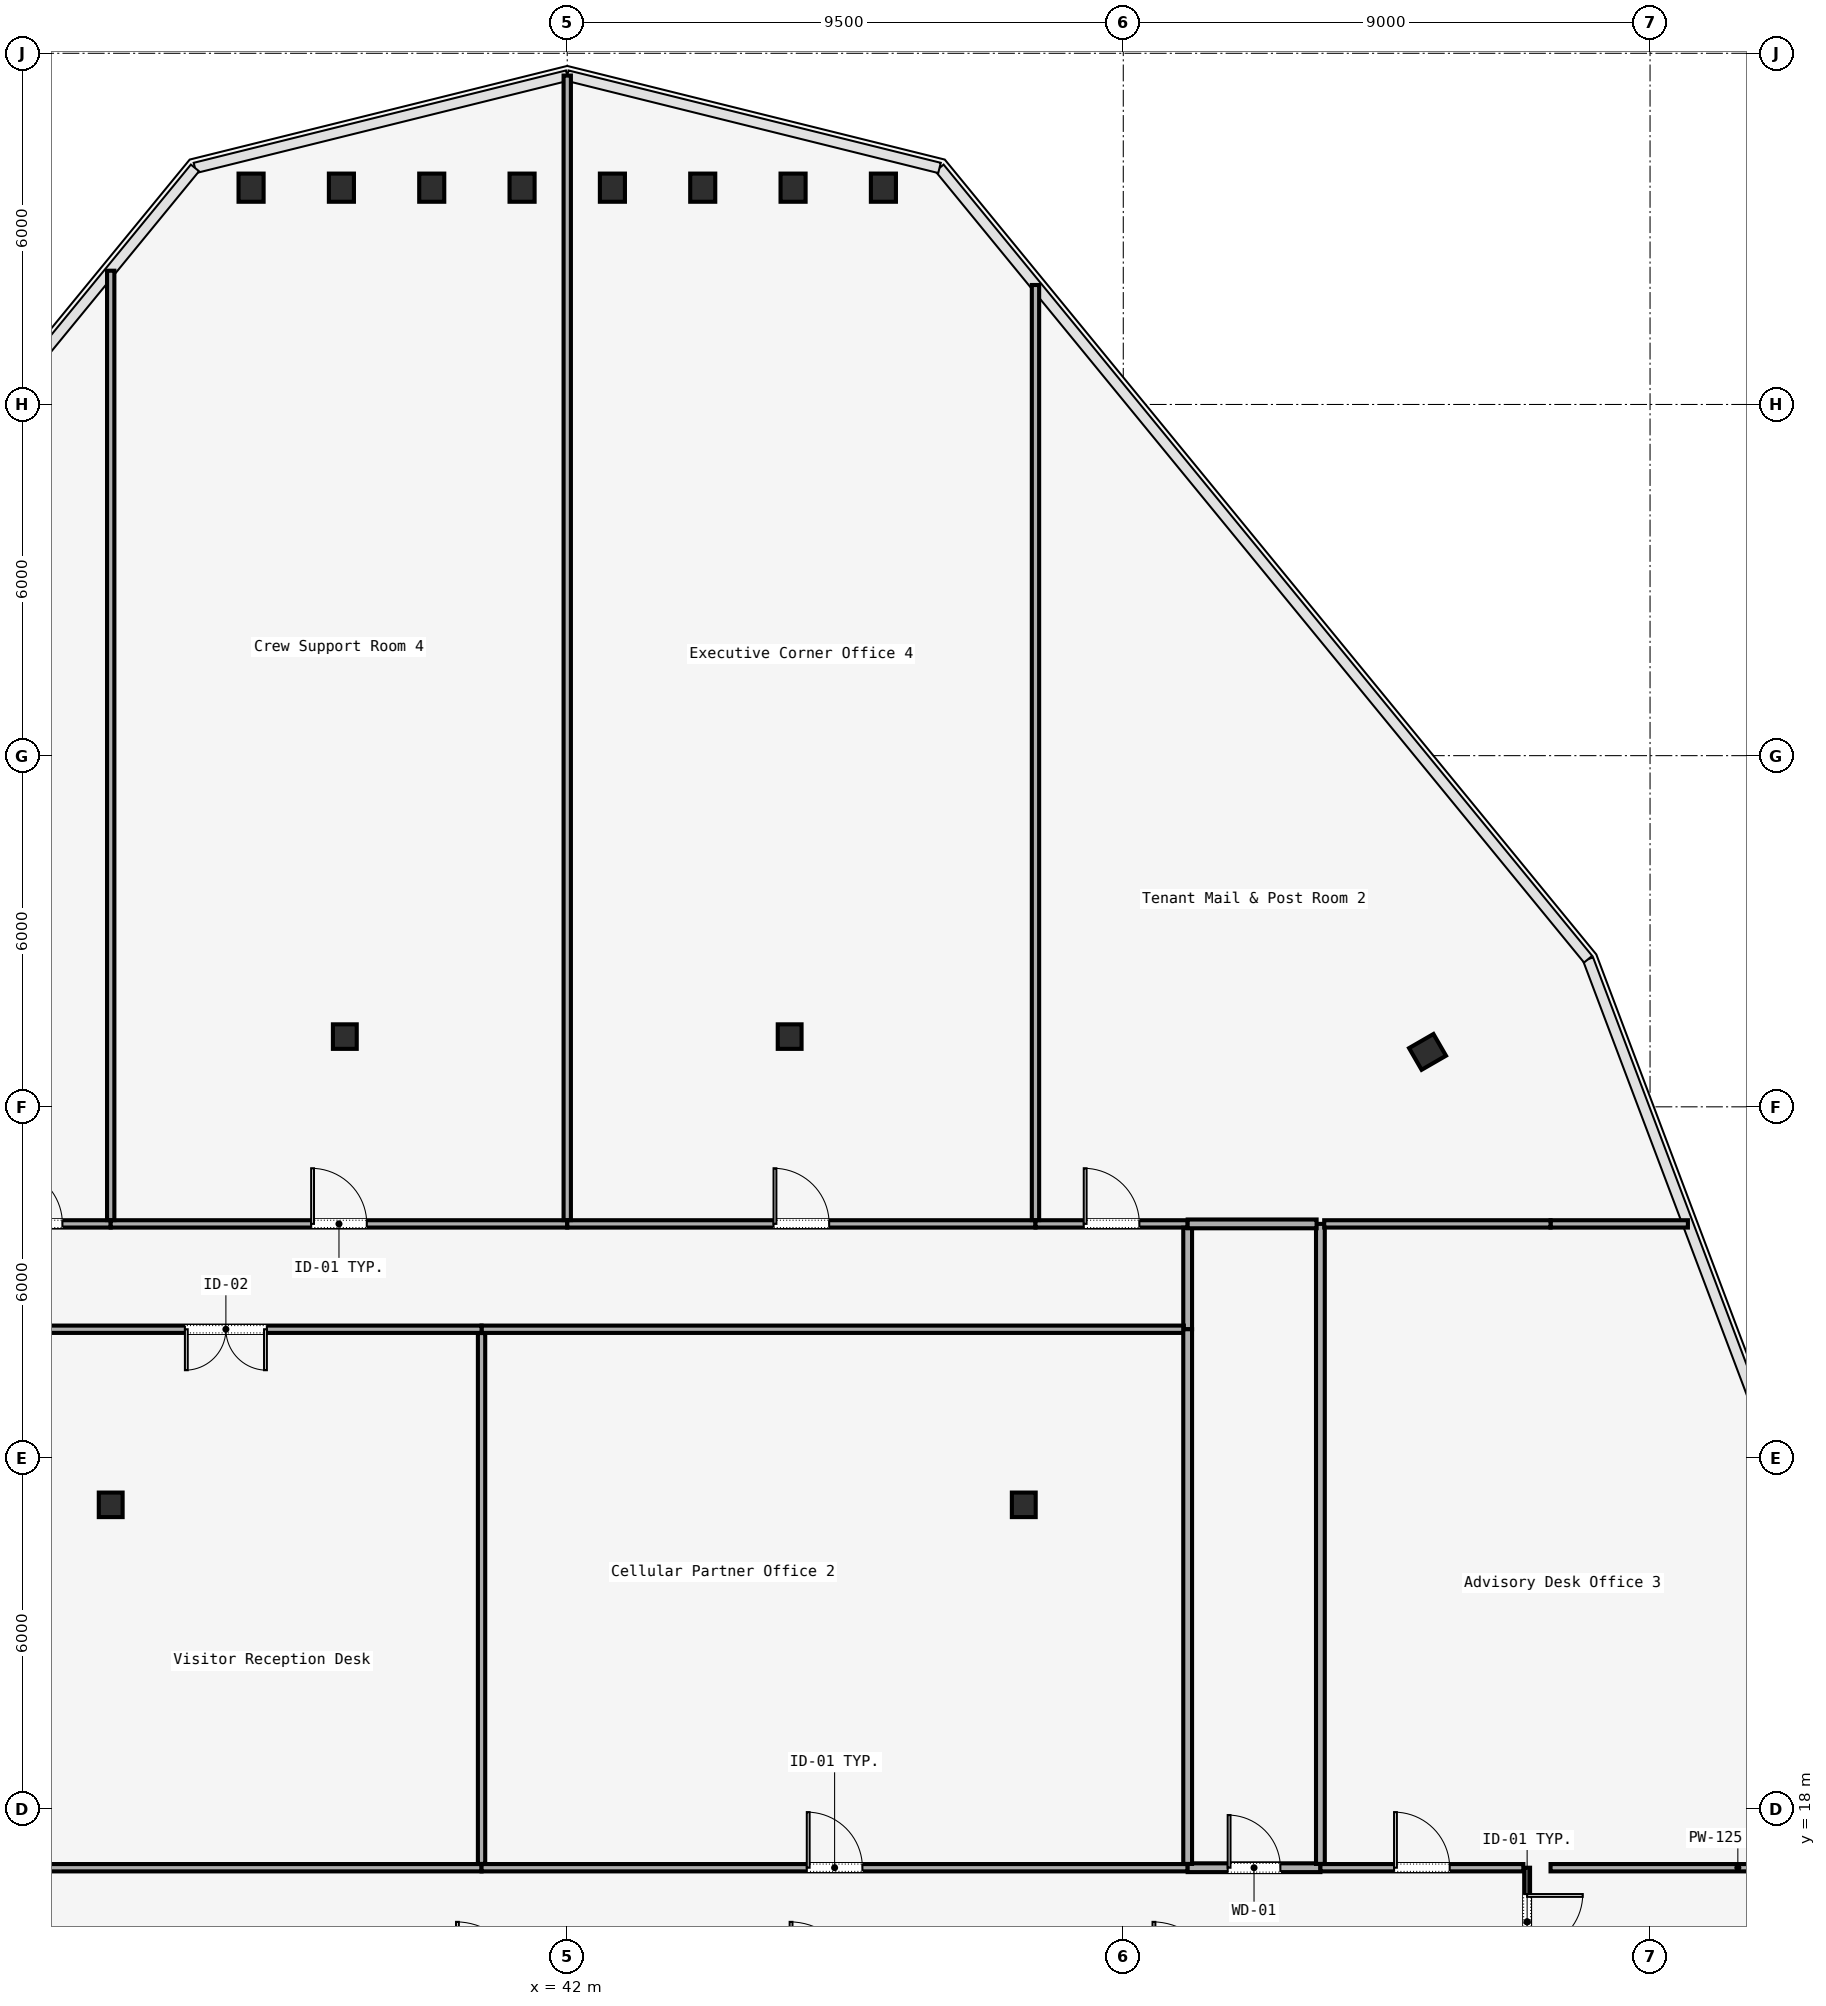
"""IFC4 building model, lengths in metres.
Left out: names, types, materials, properties, quantities, classifications, styles, units other than length and angle.
Written with IfcOpenShell. Run it as: python <this file> out.ifc"""

import sys

from ifc_helpers import new_model, si_unit, direction, frame, frame_2d, origin, origin_2d, place, context, subcontext, project, spatial, rectangle, i_section, extrude, element, fill, save


model = new_model("IFC4")
c1 = context("Model", 3, precision=1e-05, world=origin(), true_north=direction((0.0, 1.0)))
c2 = subcontext(c1, "Body", "Model", "MODEL_VIEW")
j1 = project(units=[si_unit("LENGTHUNIT", "METRE"), si_unit("PLANEANGLEUNIT", "RADIAN")], contexts=[c1])
p1 = place(None, origin())
s1 = spatial("IfcSite", under=j1, at=p1, CompositionType="ELEMENT")
p2 = place(p1, origin())
s2 = spatial("IfcBuilding", under=s1, at=p2, CompositionType="ELEMENT")
p3 = place(p2, frame((0.0, 0.0, 117.4)))
s3 = spatial("IfcBuildingStorey", under=s2, at=p3, CompositionType="ELEMENT", Elevation=117.4)
for number, where, z_axis, x_axis in (
    (1, (34.2, 23.2, 0.0), (0.0, 0.0, 1.0), (1.0, 0.0, 0.0)),
    (2, (49.8, 23.2, 0.0), (0.0, 0.0, 1.0), (1.0, 0.0, 0.0)),
    (3, (38.2, 31.2, 0.0), (0.0, 0.0, 1.0), (1.0, 0.0, 0.0)),
    (4, (45.8, 31.2, 0.0), (0.0, 0.0, 1.0), (1.0, 0.0, 0.0)),
):
    element("IfcColumn", number, at=place(p3, frame(where, z_axis=z_axis, x_axis=x_axis)), inside=s3, PredefinedType="COLUMN", context=c2, shape_type="SweptSolid", body=[
        extrude(i_section(OverallWidth=0.407, OverallDepth=0.419, WebThickness=0.031, FlangeThickness=0.049, FilletRadius=0.015, at=origin_2d()), origin(), (0.0, 0.0, 1.0), 4.52),
    ])
for number, where, z_axis, x_axis in (
    (5, (56.698, 30.938, 0.0), (0.0, 0.0, 1.0), (-0.5, 0.866, 0.0)),
    (6, (47.402, 45.704, 0.0), (0.0, 0.0, 1.0), (1.0, 0.0, 0.0)),
    (7, (45.858, 45.704, 0.0), (0.0, 0.0, 1.0), (1.0, 0.0, 0.0)),
    (8, (44.315, 45.704, 0.0), (0.0, 0.0, 1.0), (1.0, 0.0, 0.0)),
    (9, (42.772, 45.704, 0.0), (0.0, 0.0, 1.0), (1.0, 0.0, 0.0)),
    (10, (41.228, 45.704, 0.0), (0.0, 0.0, 1.0), (1.0, 0.0, 0.0)),
    (11, (39.685, 45.704, 0.0), (0.0, 0.0, 1.0), (1.0, 0.0, 0.0)),
    (12, (38.142, 45.704, 0.0), (0.0, 0.0, 1.0), (1.0, 0.0, 0.0)),
    (13, (36.598, 45.704, 0.0), (0.0, 0.0, 1.0), (1.0, 0.0, 0.0)),
):
    element("IfcColumn", number, at=place(p3, frame(where, z_axis=z_axis, x_axis=x_axis)), inside=s3, PredefinedType="COLUMN", context=c2, shape_type="SweptSolid", body=[
        extrude(i_section(OverallWidth=0.428, OverallDepth=0.481, WebThickness=0.051, FlangeThickness=0.065, FilletRadius=0.015, at=origin_2d()), origin(), (0.0, 0.0, 1.0), 4.52),
    ])
p4 = place(p3, frame((58.4, 17.0, 0.0), z_axis=(0.0, 0.0, 1.0), x_axis=(0.0, -1.0, 0.0)))
e14 = element("IfcWall", 14, at=p4, inside=s3, PredefinedType="MOVABLE", context=c2, shape_type="SweptSolid", body=[
    extrude(rectangle(XDim=1.85, YDim=0.1, at=frame_2d((0.925, 0.0))), origin(), (0.0, 0.0, 1.0), 3.39),
])
p5 = place(p4, frame((0.45, 0.0, 0.0)))
e15 = element("IfcOpeningElement", 15, at=p5, cuts=e14, PredefinedType="OPENING", context=c2, shape_type="SweptSolid", body=[
    extrude(rectangle(XDim=0.95, YDim=2.2, at=frame_2d((0.475, 1.1))), frame((0.0, 0.05, 0.0), z_axis=(0.0, -1.0, 0.0), x_axis=(1.0, 0.0, 0.0)), (0.0, 0.0, 1.0), 0.1),
])
p6 = place(p3, frame((31.6, 28.0, 0.0), z_axis=(0.0, 0.0, 1.0), x_axis=(1.0, 0.0, 0.0)))
e16 = element("IfcWall", 16, at=p6, inside=s3, PredefinedType="PARTITIONING", context=c2, shape_type="SweptSolid", body=[
    extrude(rectangle(XDim=2.6, YDim=0.125, at=frame_2d((1.3, 0.0))), origin(), (0.0, 0.0, 1.0), 3.39),
])
p7 = place(p6, frame((0.825, 0.0, 0.0)))
e17 = element("IfcOpeningElement", 17, at=p7, cuts=e16, PredefinedType="OPENING", context=c2, shape_type="SweptSolid", body=[
    extrude(rectangle(XDim=0.95, YDim=2.2, at=frame_2d((0.475, 1.1))), frame((0.0, 0.062, 0.0), z_axis=(0.0, -1.0, 0.0), x_axis=(1.0, 0.0, 0.0)), (0.0, 0.0, 1.0), 0.125),
])
p8 = place(p3, frame((34.2, 28.0, 0.0), z_axis=(0.0, 0.0, 1.0), x_axis=(1.0, 0.0, 0.0)))
e18 = element("IfcWall", 18, at=p8, inside=s3, PredefinedType="PARTITIONING", context=c2, shape_type="SweptSolid", body=[
    extrude(rectangle(XDim=7.8, YDim=0.125, at=frame_2d((3.9, 0.0))), origin(), (0.0, 0.0, 1.0), 3.39),
])
p9 = place(p8, frame((3.425, 0.0, 0.0)))
e19 = element("IfcOpeningElement", 19, at=p9, cuts=e18, PredefinedType="OPENING", context=c2, shape_type="SweptSolid", body=[
    extrude(rectangle(XDim=0.95, YDim=2.2, at=frame_2d((0.475, 1.1))), frame((0.0, 0.062, 0.0), z_axis=(0.0, -1.0, 0.0), x_axis=(1.0, 0.0, 0.0)), (0.0, 0.0, 1.0), 0.125),
])
p10 = place(p3, frame((42.0, 28.0, 0.0), z_axis=(0.0, 0.0, 1.0), x_axis=(1.0, 0.0, 0.0)))
e20 = element("IfcWall", 20, at=p10, inside=s3, PredefinedType="PARTITIONING", context=c2, shape_type="SweptSolid", body=[
    extrude(rectangle(XDim=8.0, YDim=0.125, at=frame_2d((4.0, 0.0))), origin(), (0.0, 0.0, 1.0), 3.39),
])
p11 = place(p10, frame((3.525, 0.0, 0.0)))
e21 = element("IfcOpeningElement", 21, at=p11, cuts=e20, PredefinedType="OPENING", context=c2, shape_type="SweptSolid", body=[
    extrude(rectangle(XDim=0.95, YDim=2.2, at=frame_2d((0.475, 1.1))), frame((0.0, 0.062, 0.0), z_axis=(0.0, -1.0, 0.0), x_axis=(1.0, 0.0, 0.0)), (0.0, 0.0, 1.0), 0.125),
])
p12 = place(p3, frame((50.0, 28.0, 0.0), z_axis=(0.0, 0.0, 1.0), x_axis=(1.0, 0.0, 0.0)))
e22 = element("IfcWall", 22, at=p12, inside=s3, PredefinedType="PARTITIONING", context=c2, shape_type="SweptSolid", body=[
    extrude(rectangle(XDim=2.6, YDim=0.125, at=frame_2d((1.3, 0.0))), origin(), (0.0, 0.0, 1.0), 3.39),
])
p13 = place(p12, frame((0.825, 0.0, 0.0)))
e23 = element("IfcOpeningElement", 23, at=p13, cuts=e22, PredefinedType="OPENING", context=c2, shape_type="SweptSolid", body=[
    extrude(rectangle(XDim=0.95, YDim=2.2, at=frame_2d((0.475, 1.1))), frame((0.0, 0.062, 0.0), z_axis=(0.0, -1.0, 0.0), x_axis=(1.0, 0.0, 0.0)), (0.0, 0.0, 1.0), 0.125),
])
p14 = place(p3, frame((52.6, 27.935, 0.0), z_axis=(0.0, 0.0, 1.0), x_axis=(0.0, -1.0, 0.0)))
e24 = element("IfcWall", 24, at=p14, inside=s3, PredefinedType="PARTITIONING", context=c2, shape_type="SweptSolid", body=[
    extrude(rectangle(XDim=1.735, YDim=0.15, at=frame_2d((0.868, 0.0))), origin(), (0.0, 0.0, 1.0), 3.39),
])
p15 = place(p3, frame((52.535, 26.2, 0.0), z_axis=(0.0, 0.0, 1.0), x_axis=(-1.0, 0.0, 0.0)))
e25 = element("IfcWall", 25, at=p15, inside=s3, PredefinedType="PARTITIONING", context=c2, shape_type="SweptSolid", body=[
    extrude(rectangle(XDim=11.999, YDim=0.125, at=frame_2d((6.0, 0.0))), origin(), (0.0, 0.0, 1.0), 3.39),
])
p16 = place(p3, frame((40.536, 26.2, 0.0), z_axis=(0.0, 0.0, 1.0), x_axis=(-1.0, 0.0, 0.0)))
e26 = element("IfcWall", 26, at=p16, inside=s3, PredefinedType="PARTITIONING", context=c2, shape_type="SweptSolid", body=[
    extrude(rectangle(XDim=8.736, YDim=0.125, at=frame_2d((4.368, 0.0))), origin(), (0.0, 0.0, 1.0), 3.39),
])
p17 = place(p16, frame((3.668, 0.0, 0.0)))
e27 = element("IfcOpeningElement", 27, at=p17, cuts=e26, PredefinedType="OPENING", context=c2, shape_type="SweptSolid", body=[
    extrude(rectangle(XDim=1.4, YDim=2.2, at=frame_2d((0.7, 1.1))), frame((0.0, 0.062, 0.0), z_axis=(0.0, -1.0, 0.0), x_axis=(1.0, 0.0, 0.0)), (0.0, 0.0, 1.0), 0.125),
])
p18 = place(p3, frame((31.8, 17.0, 0.0), z_axis=(0.0, 0.0, 1.0), x_axis=(1.0, 0.0, 0.0)))
e28 = element("IfcWall", 28, at=p18, inside=s3, PredefinedType="PARTITIONING", context=c2, shape_type="SweptSolid", body=[
    extrude(rectangle(XDim=8.736, YDim=0.125, at=frame_2d((4.368, 0.0))), origin(), (0.0, 0.0, 1.0), 3.39),
])
p19 = place(p3, frame((40.536, 17.0, 0.0), z_axis=(0.0, 0.0, 1.0), x_axis=(1.0, 0.0, 0.0)))
e29 = element("IfcWall", 29, at=p19, inside=s3, PredefinedType="PARTITIONING", context=c2, shape_type="SweptSolid", body=[
    extrude(rectangle(XDim=12.064, YDim=0.125, at=frame_2d((6.032, 0.0))), origin(), (0.0, 0.0, 1.0), 3.39),
])
p20 = place(p19, frame((5.557, 0.0, 0.0)))
e30 = element("IfcOpeningElement", 30, at=p20, cuts=e29, PredefinedType="OPENING", context=c2, shape_type="SweptSolid", body=[
    extrude(rectangle(XDim=0.95, YDim=2.2, at=frame_2d((0.475, 1.1))), frame((0.0, 0.062, 0.0), z_axis=(0.0, -1.0, 0.0), x_axis=(1.0, 0.0, 0.0)), (0.0, 0.0, 1.0), 0.125),
])
p21 = place(p3, frame((52.6, 17.0, 0.0), z_axis=(0.0, 0.0, 1.0), x_axis=(1.0, 0.0, 0.0)))
e31 = element("IfcWall", 31, at=p21, inside=s3, PredefinedType="PARTITIONING", context=c2, shape_type="SweptSolid", body=[
    extrude(rectangle(XDim=2.268, YDim=0.15, at=frame_2d((1.134, 0.0))), origin(), (0.0, 0.0, 1.0), 3.39),
])
p22 = place(p21, frame((0.684, 0.0, 0.0)))
e32 = element("IfcOpeningElement", 32, at=p22, cuts=e31, PredefinedType="OPENING", context=c2, shape_type="SweptSolid", body=[
    extrude(rectangle(XDim=0.9, YDim=2.15, at=frame_2d((0.45, 1.075))), frame((0.0, 0.075, 0.0), z_axis=(0.0, -1.0, 0.0), x_axis=(1.0, 0.0, 0.0)), (0.0, 0.0, 1.0), 0.15),
])
p23 = place(p3, frame((54.868, 17.0, 0.0), z_axis=(0.0, 0.0, 1.0), x_axis=(1.0, 0.0, 0.0)))
e33 = element("IfcWall", 33, at=p23, inside=s3, PredefinedType="PARTITIONING", context=c2, shape_type="SweptSolid", body=[
    extrude(rectangle(XDim=3.467, YDim=0.125, at=frame_2d((1.733, 0.0))), origin(), (0.0, 0.0, 1.0), 3.39),
])
p24 = place(p23, frame((1.259, 0.0, 0.0)))
e34 = element("IfcOpeningElement", 34, at=p24, cuts=e33, PredefinedType="OPENING", context=c2, shape_type="SweptSolid", body=[
    extrude(rectangle(XDim=0.95, YDim=2.2, at=frame_2d((0.475, 1.1))), frame((0.0, 0.062, 0.0), z_axis=(0.0, -1.0, 0.0), x_axis=(1.0, 0.0, 0.0)), (0.0, 0.0, 1.0), 0.125),
])
p25 = place(p3, frame((58.8, 17.0, 0.0), z_axis=(0.0, 0.0, 1.0), x_axis=(1.0, 0.0, 0.0)))
e35 = element("IfcWall", 35, at=p25, inside=s3, PredefinedType="PARTITIONING", context=c2, shape_type="SweptSolid", body=[
    extrude(rectangle(XDim=6.4, YDim=0.125, at=frame_2d((3.2, 0.0))), origin(), (0.0, 0.0, 1.0), 3.39),
])
p26 = place(p3, frame((40.536, 26.135, 0.0), z_axis=(0.0, 0.0, 1.0), x_axis=(0.0, -1.0, 0.0)))
e36 = element("IfcWall", 36, at=p26, inside=s3, PredefinedType="PARTITIONING", context=c2, shape_type="SweptSolid", body=[
    extrude(rectangle(XDim=9.07, YDim=0.125, at=frame_2d((4.535, 0.0))), origin(), (0.0, 0.0, 1.0), 3.39),
])
p27 = place(p3, frame((52.6, 26.2, 0.0), z_axis=(0.0, 0.0, 1.0), x_axis=(0.0, -1.0, 0.0)))
e37 = element("IfcWall", 37, at=p27, inside=s3, PredefinedType="PARTITIONING", context=c2, shape_type="SweptSolid", body=[
    extrude(rectangle(XDim=9.135, YDim=0.15, at=frame_2d((4.567, 0.0))), origin(), (0.0, 0.0, 1.0), 3.39),
])
p28 = place(p3, frame((58.8, 28.0, 0.0), z_axis=(0.0, 0.0, 1.0), x_axis=(1.0, 0.0, 0.0)))
e38 = element("IfcWall", 38, at=p28, inside=s3, PredefinedType="PARTITIONING", context=c2, shape_type="SweptSolid", body=[
    extrude(rectangle(XDim=2.347, YDim=0.125, at=frame_2d((1.173, 0.0))), origin(), (0.0, 0.0, 1.0), 3.39),
])
p29 = place(p3, frame((54.868, 17.065, 0.0), z_axis=(0.0, 0.0, 1.0), x_axis=(0.0, 1.0, 0.0)))
e39 = element("IfcWall", 39, at=p29, inside=s3, PredefinedType="PARTITIONING", context=c2, shape_type="SweptSolid", body=[
    extrude(rectangle(XDim=10.935, YDim=0.15, at=frame_2d((5.468, 0.0))), origin(), (0.0, 0.0, 1.0), 3.39),
])
p30 = place(p3, frame((54.933, 28.0, 0.0), z_axis=(0.0, 0.0, 1.0), x_axis=(1.0, 0.0, 0.0)))
e40 = element("IfcWall", 40, at=p30, inside=s3, PredefinedType="PARTITIONING", context=c2, shape_type="SweptSolid", body=[
    extrude(rectangle(XDim=3.867, YDim=0.125, at=frame_2d((1.934, 0.0))), origin(), (0.0, 0.0, 1.0), 3.39),
])
p31 = place(p3, frame((52.6, 28.0, 0.0), z_axis=(0.0, 0.0, 1.0), x_axis=(1.0, 0.0, 0.0)))
e41 = element("IfcWall", 41, at=p31, inside=s3, PredefinedType="PARTITIONING", context=c2, shape_type="SweptSolid", body=[
    extrude(rectangle(XDim=2.203, YDim=0.15, at=frame_2d((1.102, 0.0))), origin(), (0.0, 0.0, 1.0), 3.39),
])
p32 = place(p3, frame((50.0, 28.065, 0.0), z_axis=(0.0, 0.0, 1.0), x_axis=(0.0, 1.0, 0.0)))
e42 = element("IfcWall", 42, at=p32, inside=s3, PredefinedType="PARTITIONING", context=c2, shape_type="SweptSolid", body=[
    extrude(rectangle(XDim=15.976, YDim=0.125, at=frame_2d((7.988, 0.0))), origin(), (0.0, 0.0, 1.0), 3.39),
])
p33 = place(p3, frame((34.2, 44.285, 0.0), z_axis=(0.0, 0.0, 1.0), x_axis=(0.0, -1.0, 0.0)))
e43 = element("IfcWall", 43, at=p33, inside=s3, PredefinedType="PARTITIONING", context=c2, shape_type="SweptSolid", body=[
    extrude(rectangle(XDim=16.22, YDim=0.125, at=frame_2d((8.11, 0.0))), origin(), (0.0, 0.0, 1.0), 3.39),
])
p34 = place(p3, frame((42.0, 28.065, 0.0), z_axis=(0.0, 0.0, 1.0), x_axis=(0.0, 1.0, 0.0)))
e44 = element("IfcWall", 44, at=p34, inside=s3, PredefinedType="PARTITIONING", context=c2, shape_type="SweptSolid", body=[
    extrude(rectangle(XDim=19.554, YDim=0.125, at=frame_2d((9.777, 0.0))), origin(), (0.0, 0.0, 1.0), 3.39),
])
p35 = place(p5, origin())
e45 = element("IfcDoor", 45, at=p35, inside=s3, OperationType="SINGLE_SWING_LEFT", PredefinedType="DOOR", context=c2, shape_type="SweptSolid", body=[
    extrude(rectangle(XDim=0.95, YDim=2.2, at=frame_2d((0.475, 1.1))), frame((0.0, 0.025, 0.0), z_axis=(0.0, -1.0, 0.0), x_axis=(1.0, 0.0, 0.0)), (0.0, 0.0, 1.0), 0.05),
])
fill(e15, e45)
p36 = place(p17, origin())
e46 = element("IfcDoor", 46, at=p36, inside=s3, OperationType="SINGLE_SWING_LEFT", PredefinedType="DOOR", context=c2, shape_type="SweptSolid", body=[
    extrude(rectangle(XDim=1.4, YDim=2.2, at=frame_2d((0.7, 1.1))), frame((0.0, 0.025, 0.0), z_axis=(0.0, -1.0, 0.0), x_axis=(1.0, 0.0, 0.0)), (0.0, 0.0, 1.0), 0.05),
])
fill(e27, e46)
p37 = place(p20, origin())
e47 = element("IfcDoor", 47, at=p37, inside=s3, OperationType="SINGLE_SWING_RIGHT", PredefinedType="DOOR", context=c2, shape_type="SweptSolid", body=[
    extrude(rectangle(XDim=0.95, YDim=2.2, at=frame_2d((0.475, 1.1))), frame((0.0, 0.025, 0.0), z_axis=(0.0, -1.0, 0.0), x_axis=(1.0, 0.0, 0.0)), (0.0, 0.0, 1.0), 0.05),
])
fill(e30, e47)
p38 = place(p24, origin())
e48 = element("IfcDoor", 48, at=p38, inside=s3, OperationType="SINGLE_SWING_LEFT", PredefinedType="DOOR", context=c2, shape_type="SweptSolid", body=[
    extrude(rectangle(XDim=0.95, YDim=2.2, at=frame_2d((0.475, 1.1))), frame((0.0, 0.025, 0.0), z_axis=(0.0, -1.0, 0.0), x_axis=(1.0, 0.0, 0.0)), (0.0, 0.0, 1.0), 0.05),
])
fill(e34, e48)
p39 = place(p22, origin())
e49 = element("IfcDoor", 49, at=p39, inside=s3, OperationType="SINGLE_SWING_RIGHT", PredefinedType="DOOR", context=c2, shape_type="SweptSolid", body=[
    extrude(rectangle(XDim=0.9, YDim=2.15, at=frame_2d((0.45, 1.075))), frame((0.0, 0.025, 0.0), z_axis=(0.0, -1.0, 0.0), x_axis=(1.0, 0.0, 0.0)), (0.0, 0.0, 1.0), 0.05),
])
fill(e32, e49)
p40 = place(p13, origin())
e50 = element("IfcDoor", 50, at=p40, inside=s3, OperationType="SINGLE_SWING_RIGHT", PredefinedType="DOOR", context=c2, shape_type="SweptSolid", body=[
    extrude(rectangle(XDim=0.95, YDim=2.2, at=frame_2d((0.475, 1.1))), frame((0.0, 0.025, 0.0), z_axis=(0.0, -1.0, 0.0), x_axis=(1.0, 0.0, 0.0)), (0.0, 0.0, 1.0), 0.05),
])
fill(e23, e50)
p41 = place(p7, origin())
e51 = element("IfcDoor", 51, at=p41, inside=s3, OperationType="SINGLE_SWING_LEFT", PredefinedType="DOOR", context=c2, shape_type="SweptSolid", body=[
    extrude(rectangle(XDim=0.95, YDim=2.2, at=frame_2d((0.475, 1.1))), frame((0.0, 0.025, 0.0), z_axis=(0.0, -1.0, 0.0), x_axis=(1.0, 0.0, 0.0)), (0.0, 0.0, 1.0), 0.05),
])
fill(e17, e51)
p42 = place(p11, origin())
e52 = element("IfcDoor", 52, at=p42, inside=s3, OperationType="SINGLE_SWING_RIGHT", PredefinedType="DOOR", context=c2, shape_type="SweptSolid", body=[
    extrude(rectangle(XDim=0.95, YDim=2.2, at=frame_2d((0.475, 1.1))), frame((0.0, 0.025, 0.0), z_axis=(0.0, -1.0, 0.0), x_axis=(1.0, 0.0, 0.0)), (0.0, 0.0, 1.0), 0.05),
])
fill(e21, e52)
p43 = place(p9, origin())
e53 = element("IfcDoor", 53, at=p43, inside=s3, OperationType="SINGLE_SWING_LEFT", PredefinedType="DOOR", context=c2, shape_type="SweptSolid", body=[
    extrude(rectangle(XDim=0.95, YDim=2.2, at=frame_2d((0.475, 1.1))), frame((0.0, 0.025, 0.0), z_axis=(0.0, -1.0, 0.0), x_axis=(1.0, 0.0, 0.0)), (0.0, 0.0, 1.0), 0.05),
])
fill(e19, e53)
save(model, sys.argv[1])
